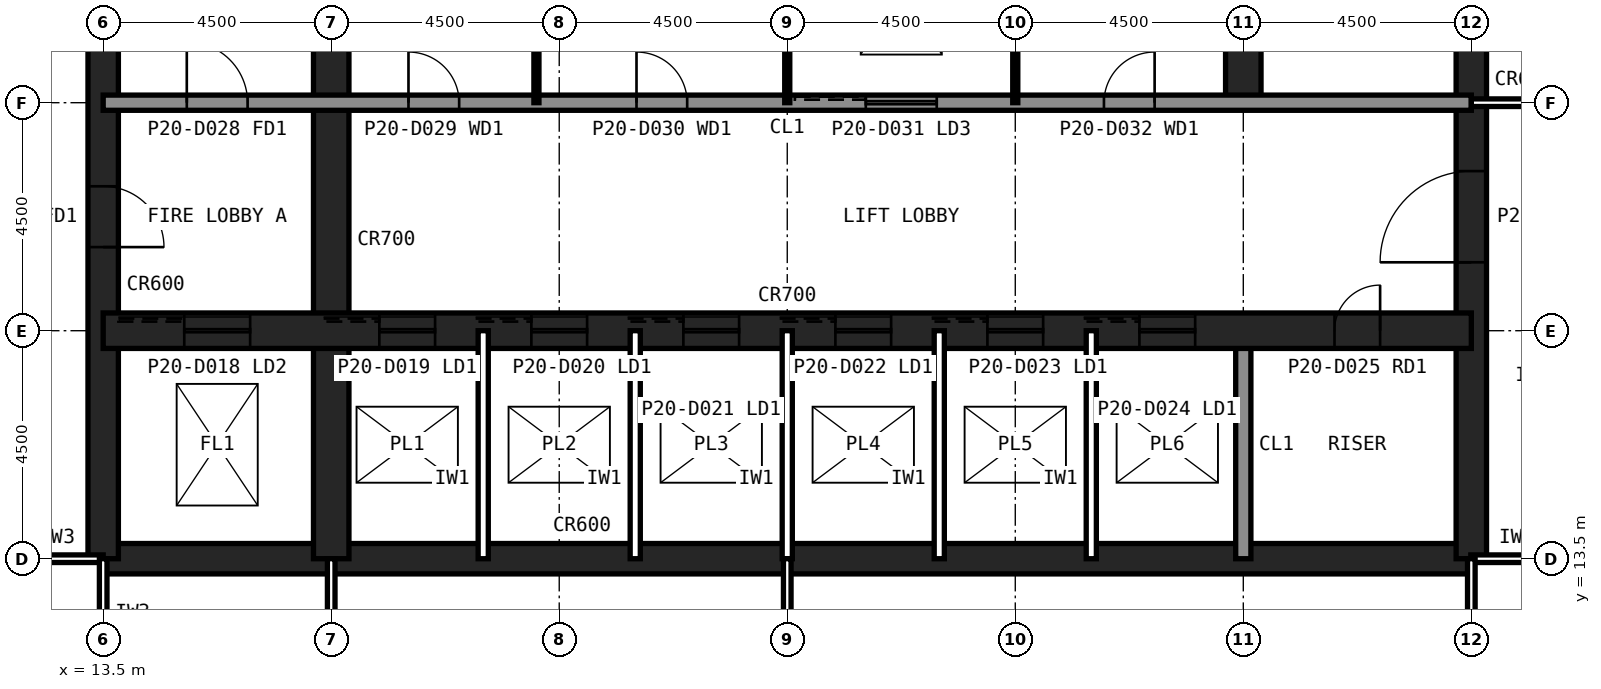
"""IFC4 building model, lengths in metres.
Left out: names, types, materials, properties, quantities, classifications, styles, units other than length and angle.
Written with IfcOpenShell. Run it as: python <this file> out.ifc"""

import sys

from ifc_helpers import new_model, si_unit, direction, frame, frame_2d, origin, place, context, subcontext, project, spatial, rectangle, extrude, element, fill, save


model = new_model("IFC4")
c1 = context("Model", 3, precision=1e-05, world=origin(), true_north=direction((0.0, 1.0)))
c2 = subcontext(c1, "Body", "Model", "MODEL_VIEW")
j1 = project(units=[si_unit("LENGTHUNIT", "METRE"), si_unit("PLANEANGLEUNIT", "RADIAN")], contexts=[c1])
p1 = place(None, origin())
s1 = spatial("IfcSite", under=j1, at=p1, CompositionType="ELEMENT")
p2 = place(p1, origin())
s2 = spatial("IfcBuilding", under=s1, at=p2, CompositionType="ELEMENT")
p3 = place(p2, frame((0.0, 0.0, 87.8)))
s3 = spatial("IfcBuildingStorey", under=s2, at=p3, CompositionType="ELEMENT", Elevation=87.8)
p4 = place(p3, frame((13.5, 13.5, 0.0), z_axis=(0.0, 0.0, 1.0), x_axis=(1.0, 0.0, 0.0)))
e1 = element("IfcWall", 1, at=p4, inside=s3, PredefinedType="SHEAR", context=c2, shape_type="SweptSolid", body=[
    extrude(rectangle(XDim=27.0, YDim=0.6, at=frame_2d((13.5, 0.0))), origin(), (0.0, 0.0, 1.0), 4.2),
])
p5 = place(p3, frame((40.5, 13.5, 0.0), z_axis=(0.0, 0.0, 1.0), x_axis=(0.0, 1.0, 0.0)))
e2 = element("IfcWall", 2, at=p5, inside=s3, PredefinedType="SHEAR", context=c2, shape_type="SweptSolid", body=[
    extrude(rectangle(XDim=27.0, YDim=0.6, at=frame_2d((13.5, 0.0))), origin(), (0.0, 0.0, 1.0), 4.2),
])
p6 = place(p5, frame((5.85, 0.0, 0.0)))
e3 = element("IfcOpeningElement", 3, at=p6, cuts=e2, PredefinedType="OPENING", context=c2, shape_type="SweptSolid", body=[
    extrude(rectangle(XDim=1.8, YDim=2.1, at=frame_2d((0.9, 1.05))), frame((0.0, 0.31, 0.0), z_axis=(0.0, -1.0, 0.0), x_axis=(1.0, 0.0, 0.0)), (0.0, 0.0, 1.0), 0.62),
])
p7 = place(p5, frame((19.65, 0.0, 0.0)))
e4 = element("IfcOpeningElement", 4, at=p7, cuts=e2, PredefinedType="OPENING", context=c2, shape_type="SweptSolid", body=[
    extrude(rectangle(XDim=1.2, YDim=2.1, at=frame_2d((0.6, 1.05))), frame((0.0, 0.31, 0.0), z_axis=(0.0, -1.0, 0.0), x_axis=(1.0, 0.0, 0.0)), (0.0, 0.0, 1.0), 0.62),
])
p8 = place(p3, frame((13.5, 40.5, 0.0), z_axis=(0.0, 0.0, 1.0), x_axis=(0.0, -1.0, 0.0)))
e5 = element("IfcWall", 5, at=p8, inside=s3, PredefinedType="SHEAR", context=c2, shape_type="SweptSolid", body=[
    extrude(rectangle(XDim=27.0, YDim=0.6, at=frame_2d((13.5, 0.0))), origin(), (0.0, 0.0, 1.0), 4.2),
])
p9 = place(p8, frame((19.65, 0.0, 0.0)))
e6 = element("IfcOpeningElement", 6, at=p9, cuts=e5, PredefinedType="OPENING", context=c2, shape_type="SweptSolid", body=[
    extrude(rectangle(XDim=1.2, YDim=2.1, at=frame_2d((0.6, 1.05))), frame((0.0, 0.31, 0.0), z_axis=(0.0, -1.0, 0.0), x_axis=(1.0, 0.0, 0.0)), (0.0, 0.0, 1.0), 0.62),
])
p10 = place(p8, frame((5.85, 0.0, 0.0)))
e7 = element("IfcOpeningElement", 7, at=p10, cuts=e5, PredefinedType="OPENING", context=c2, shape_type="SweptSolid", body=[
    extrude(rectangle(XDim=1.8, YDim=2.1, at=frame_2d((0.9, 1.05))), frame((0.0, 0.31, 0.0), z_axis=(0.0, -1.0, 0.0), x_axis=(1.0, 0.0, 0.0)), (0.0, 0.0, 1.0), 0.62),
])
p11 = place(p3, frame((18.0, 13.5, 0.0), z_axis=(0.0, 0.0, 1.0), x_axis=(0.0, 1.0, 0.0)))
e8 = element("IfcWall", 8, at=p11, inside=s3, PredefinedType="SHEAR", context=c2, shape_type="SweptSolid", body=[
    extrude(rectangle(XDim=18.0, YDim=0.7, at=frame_2d((9.0, 0.0))), origin(), (0.0, 0.0, 1.0), 4.2),
])
p12 = place(p3, frame((36.0, 13.5, 0.0), z_axis=(0.0, 0.0, 1.0), x_axis=(0.0, 1.0, 0.0)))
e9 = element("IfcWall", 9, at=p12, inside=s3, PredefinedType="SOLIDWALL", context=c2, shape_type="SweptSolid", body=[
    extrude(rectangle(XDim=4.5, YDim=0.3, at=frame_2d((2.25, 0.0))), origin(), (0.0, 0.0, 1.0), 4.04),
])
p13 = place(p3, frame((36.0, 22.5, 0.0), z_axis=(0.0, 0.0, 1.0), x_axis=(0.0, 1.0, 0.0)))
e10 = element("IfcWall", 10, at=p13, inside=s3, PredefinedType="SHEAR", context=c2, shape_type="SweptSolid", body=[
    extrude(rectangle(XDim=18.0, YDim=0.7, at=frame_2d((9.0, 0.0))), origin(), (0.0, 0.0, 1.0), 4.2),
])
p14 = place(p3, frame((13.5, 18.0, 0.0), z_axis=(0.0, 0.0, 1.0), x_axis=(1.0, 0.0, 0.0)))
e11 = element("IfcWall", 11, at=p14, inside=s3, PredefinedType="SHEAR", context=c2, shape_type="SweptSolid", body=[
    extrude(rectangle(XDim=27.0, YDim=0.7, at=frame_2d((13.5, 0.0))), origin(), (0.0, 0.0, 1.0), 4.2),
])
p15 = place(p14, frame((24.3, 0.0, 0.0)))
e12 = element("IfcOpeningElement", 12, at=p15, cuts=e11, PredefinedType="OPENING", context=c2, shape_type="SweptSolid", body=[
    extrude(rectangle(XDim=0.9, YDim=2.1, at=frame_2d((0.45, 1.05))), frame((0.0, 0.36, 0.0), z_axis=(0.0, -1.0, 0.0), x_axis=(1.0, 0.0, 0.0)), (0.0, 0.0, 1.0), 0.72),
])
p16 = place(p14, frame((5.45, 0.0, 0.0)))
e13 = element("IfcOpeningElement", 13, at=p16, cuts=e11, PredefinedType="OPENING", context=c2, shape_type="SweptSolid", body=[
    extrude(rectangle(XDim=1.1, YDim=2.1, at=frame_2d((0.55, 1.05))), frame((0.0, 0.36, 0.0), z_axis=(0.0, -1.0, 0.0), x_axis=(1.0, 0.0, 0.0)), (0.0, 0.0, 1.0), 0.72),
])
p17 = place(p14, frame((8.45, 0.0, 0.0)))
e14 = element("IfcOpeningElement", 14, at=p17, cuts=e11, PredefinedType="OPENING", context=c2, shape_type="SweptSolid", body=[
    extrude(rectangle(XDim=1.1, YDim=2.1, at=frame_2d((0.55, 1.05))), frame((0.0, 0.36, 0.0), z_axis=(0.0, -1.0, 0.0), x_axis=(1.0, 0.0, 0.0)), (0.0, 0.0, 1.0), 0.72),
])
p18 = place(p14, frame((11.45, 0.0, 0.0)))
e15 = element("IfcOpeningElement", 15, at=p18, cuts=e11, PredefinedType="OPENING", context=c2, shape_type="SweptSolid", body=[
    extrude(rectangle(XDim=1.1, YDim=2.1, at=frame_2d((0.55, 1.05))), frame((0.0, 0.36, 0.0), z_axis=(0.0, -1.0, 0.0), x_axis=(1.0, 0.0, 0.0)), (0.0, 0.0, 1.0), 0.72),
])
p19 = place(p14, frame((14.45, 0.0, 0.0)))
e16 = element("IfcOpeningElement", 16, at=p19, cuts=e11, PredefinedType="OPENING", context=c2, shape_type="SweptSolid", body=[
    extrude(rectangle(XDim=1.1, YDim=2.1, at=frame_2d((0.55, 1.05))), frame((0.0, 0.36, 0.0), z_axis=(0.0, -1.0, 0.0), x_axis=(1.0, 0.0, 0.0)), (0.0, 0.0, 1.0), 0.72),
])
p20 = place(p14, frame((17.45, 0.0, 0.0)))
e17 = element("IfcOpeningElement", 17, at=p20, cuts=e11, PredefinedType="OPENING", context=c2, shape_type="SweptSolid", body=[
    extrude(rectangle(XDim=1.1, YDim=2.1, at=frame_2d((0.55, 1.05))), frame((0.0, 0.36, 0.0), z_axis=(0.0, -1.0, 0.0), x_axis=(1.0, 0.0, 0.0)), (0.0, 0.0, 1.0), 0.72),
])
p21 = place(p14, frame((20.45, 0.0, 0.0)))
e18 = element("IfcOpeningElement", 18, at=p21, cuts=e11, PredefinedType="OPENING", context=c2, shape_type="SweptSolid", body=[
    extrude(rectangle(XDim=1.1, YDim=2.1, at=frame_2d((0.55, 1.05))), frame((0.0, 0.36, 0.0), z_axis=(0.0, -1.0, 0.0), x_axis=(1.0, 0.0, 0.0)), (0.0, 0.0, 1.0), 0.72),
])
p22 = place(p14, frame((1.6, 0.0, 0.0)))
e19 = element("IfcOpeningElement", 19, at=p22, cuts=e11, PredefinedType="OPENING", context=c2, shape_type="SweptSolid", body=[
    extrude(rectangle(XDim=1.3, YDim=2.2, at=frame_2d((0.65, 1.1))), frame((0.0, 0.36, 0.0), z_axis=(0.0, -1.0, 0.0), x_axis=(1.0, 0.0, 0.0)), (0.0, 0.0, 1.0), 0.72),
])
p23 = place(p3, frame((13.5, 22.5, 0.0), z_axis=(0.0, 0.0, 1.0), x_axis=(1.0, 0.0, 0.0)))
e20 = element("IfcWall", 20, at=p23, inside=s3, PredefinedType="SOLIDWALL", context=c2, shape_type="SweptSolid", body=[
    extrude(rectangle(XDim=27.0, YDim=0.3, at=frame_2d((13.5, 0.0))), origin(), (0.0, 0.0, 1.0), 4.04),
])
p24 = place(p23, frame((1.65, 0.0, 0.0)))
e21 = element("IfcOpeningElement", 21, at=p24, cuts=e20, PredefinedType="OPENING", context=c2, shape_type="SweptSolid", body=[
    extrude(rectangle(XDim=1.2, YDim=2.1, at=frame_2d((0.6, 1.05))), frame((0.0, 0.16, 0.0), z_axis=(0.0, -1.0, 0.0), x_axis=(1.0, 0.0, 0.0)), (0.0, 0.0, 1.0), 0.32),
])
p25 = place(p23, frame((6.025, 0.0, 0.0)))
e22 = element("IfcOpeningElement", 22, at=p25, cuts=e20, PredefinedType="OPENING", context=c2, shape_type="SweptSolid", body=[
    extrude(rectangle(XDim=1.0, YDim=2.1, at=frame_2d((0.5, 1.05))), frame((0.0, 0.16, 0.0), z_axis=(0.0, -1.0, 0.0), x_axis=(1.0, 0.0, 0.0)), (0.0, 0.0, 1.0), 0.32),
])
p26 = place(p23, frame((10.525, 0.0, 0.0)))
e23 = element("IfcOpeningElement", 23, at=p26, cuts=e20, PredefinedType="OPENING", context=c2, shape_type="SweptSolid", body=[
    extrude(rectangle(XDim=1.0, YDim=2.1, at=frame_2d((0.5, 1.05))), frame((0.0, 0.16, 0.0), z_axis=(0.0, -1.0, 0.0), x_axis=(1.0, 0.0, 0.0)), (0.0, 0.0, 1.0), 0.32),
])
p27 = place(p23, frame((19.75, 0.0, 0.0)))
e24 = element("IfcOpeningElement", 24, at=p27, cuts=e20, PredefinedType="OPENING", context=c2, shape_type="SweptSolid", body=[
    extrude(rectangle(XDim=1.0, YDim=2.1, at=frame_2d((0.5, 1.05))), frame((0.0, 0.16, 0.0), z_axis=(0.0, -1.0, 0.0), x_axis=(1.0, 0.0, 0.0)), (0.0, 0.0, 1.0), 0.32),
])
p28 = place(p23, frame((15.05, 0.0, 0.0)))
e25 = element("IfcOpeningElement", 25, at=p28, cuts=e20, PredefinedType="OPENING", context=c2, shape_type="SweptSolid", body=[
    extrude(rectangle(XDim=1.4, YDim=2.4, at=frame_2d((0.7, 1.2))), frame((0.0, 0.16, 0.0), z_axis=(0.0, -1.0, 0.0), x_axis=(1.0, 0.0, 0.0)), (0.0, 0.0, 1.0), 0.32),
])
for number, where, z_axis, x_axis in (
    (26, (21.0, 13.5, 0.0), (0.0, 0.0, 1.0), (0.0, 1.0, 0.0)),
    (27, (24.0, 13.5, 0.0), (0.0, 0.0, 1.0), (0.0, 1.0, 0.0)),
    (28, (27.0, 13.5, 0.0), (0.0, 0.0, 1.0), (0.0, 1.0, 0.0)),
    (29, (30.0, 13.5, 0.0), (0.0, 0.0, 1.0), (0.0, 1.0, 0.0)),
    (30, (33.0, 13.5, 0.0), (0.0, 0.0, 1.0), (0.0, 1.0, 0.0)),
):
    element("IfcWall", number, at=place(p3, frame(where, z_axis=z_axis, x_axis=x_axis)), inside=s3, PredefinedType="PARTITIONING", context=c2, shape_type="SweptSolid", body=[
        extrude(rectangle(XDim=4.5, YDim=0.2, at=frame_2d((2.25, 0.0))), origin(), (0.0, 0.0, 1.0), 4.04),
    ])
for number, where, z_axis, x_axis in (
    (31, (22.05, 22.5, 0.0), (0.0, 0.0, 1.0), (0.0, 1.0, 0.0)),
    (32, (27.0, 22.5, 0.0), (0.0, 0.0, 1.0), (0.0, 1.0, 0.0)),
    (33, (31.5, 22.5, 0.0), (0.0, 0.0, 1.0), (0.0, 1.0, 0.0)),
):
    element("IfcWall", number, at=place(p3, frame(where, z_axis=z_axis, x_axis=x_axis)), inside=s3, PredefinedType="PLUMBINGWALL", context=c2, shape_type="SweptSolid", body=[
        extrude(rectangle(XDim=9.0, YDim=0.1, at=frame_2d((4.5, 0.0))), origin(), (0.0, 0.0, 1.0), 4.04),
    ])
p29 = place(p3, frame((40.49, 13.5, 0.0), z_axis=(0.0, 0.0, 1.0), x_axis=(1.0, 0.0, 0.0)))
e34 = element("IfcWall", 34, at=p29, inside=s3, PredefinedType="PARTITIONING", context=c2, shape_type="SweptSolid", body=[
    extrude(rectangle(XDim=1.81, YDim=0.15, at=frame_2d((0.905, 0.0))), origin(), (0.0, 0.0, 1.0), 3.189),
])
p30 = place(p3, frame((11.7, 13.5, 0.0), z_axis=(0.0, 0.0, 1.0), x_axis=(1.0, 0.0, 0.0)))
e35 = element("IfcWall", 35, at=p30, inside=s3, PredefinedType="PARTITIONING", context=c2, shape_type="SweptSolid", body=[
    extrude(rectangle(XDim=1.8, YDim=0.15, at=frame_2d((0.9, 0.0))), origin(), (0.0, 0.0, 1.0), 3.189),
])
p31 = place(p3, frame((18.0, 8.1, 0.0), z_axis=(0.0, 0.0, 1.0), x_axis=(0.0, 1.0, 0.0)))
e36 = element("IfcWall", 36, at=p31, inside=s3, PredefinedType="PARTITIONING", context=c2, shape_type="SweptSolid", body=[
    extrude(rectangle(XDim=5.4, YDim=0.15, at=frame_2d((2.7, 0.0))), origin(), (0.0, 0.0, 1.0), 3.189),
])
p32 = place(p3, frame((13.5, 13.5, 0.0), z_axis=(0.0, 0.0, 1.0), x_axis=(0.0, -1.0, 0.0)))
e37 = element("IfcWall", 37, at=p32, inside=s3, PredefinedType="PARTITIONING", context=c2, shape_type="SweptSolid", body=[
    extrude(rectangle(XDim=5.4, YDim=0.15, at=frame_2d((2.7, 0.0))), origin(), (0.0, 0.0, 1.0), 3.189),
])
p33 = place(p32, frame((2.2, 0.0, 0.0)))
e38 = element("IfcOpeningElement", 38, at=p33, cuts=e37, PredefinedType="OPENING", context=c2, shape_type="SweptSolid", body=[
    extrude(rectangle(XDim=1.0, YDim=2.1, at=frame_2d((0.5, 1.05))), frame((0.0, 0.085, 0.0), z_axis=(0.0, -1.0, 0.0), x_axis=(1.0, 0.0, 0.0)), (0.0, 0.0, 1.0), 0.17),
])
p34 = place(p3, frame((27.0, 9.0, 0.0), z_axis=(0.0, 0.0, 1.0), x_axis=(0.0, 1.0, 0.0)))
e39 = element("IfcWall", 39, at=p34, inside=s3, PredefinedType="PARTITIONING", context=c2, shape_type="SweptSolid", body=[
    extrude(rectangle(XDim=4.5, YDim=0.15, at=frame_2d((2.25, 0.0))), origin(), (0.0, 0.0, 1.0), 3.189),
])
p35 = place(p34, frame((1.75, 0.0, 0.0)))
e40 = element("IfcOpeningElement", 40, at=p35, cuts=e39, PredefinedType="OPENING", context=c2, shape_type="SweptSolid", body=[
    extrude(rectangle(XDim=1.0, YDim=2.1, at=frame_2d((0.5, 1.05))), frame((0.0, 0.085, 0.0), z_axis=(0.0, -1.0, 0.0), x_axis=(1.0, 0.0, 0.0)), (0.0, 0.0, 1.0), 0.17),
])
p36 = place(p3, frame((40.5, 22.5, 0.0), z_axis=(0.0, 0.0, 1.0), x_axis=(1.0, 0.0, 0.0)))
e41 = element("IfcWall", 41, at=p36, inside=s3, PredefinedType="PARTITIONING", context=c2, shape_type="SweptSolid", body=[
    extrude(rectangle(XDim=3.6, YDim=0.15, at=frame_2d((1.8, 0.0))), origin(), (0.0, 0.0, 1.0), 3.189),
])
p37 = place(p3, frame((40.5, 0.445, 0.0), z_axis=(0.0, 0.0, 1.0), x_axis=(0.0, 1.0, 0.0)))
e42 = element("IfcWall", 42, at=p37, inside=s3, PredefinedType="PARTITIONING", context=c2, shape_type="SweptSolid", body=[
    extrude(rectangle(XDim=13.055, YDim=0.15, at=frame_2d((6.527, 0.0))), origin(), (0.0, 0.0, 1.0), 3.189),
])
p38 = place(p37, frame((6.028, 0.0, 0.0)))
e43 = element("IfcOpeningElement", 43, at=p38, cuts=e42, PredefinedType="OPENING", context=c2, shape_type="SweptSolid", body=[
    extrude(rectangle(XDim=1.0, YDim=2.1, at=frame_2d((0.5, 1.05))), frame((0.0, 0.085, 0.0), z_axis=(0.0, -1.0, 0.0), x_axis=(1.0, 0.0, 0.0)), (0.0, 0.0, 1.0), 0.17),
])
p39 = place(p9, origin())
e44 = element("IfcDoor", 44, at=p39, inside=s3, OperationType="SINGLE_SWING_RIGHT", PredefinedType="DOOR", context=c2, shape_type="SweptSolid", body=[
    extrude(rectangle(XDim=1.2, YDim=2.1, at=frame_2d((0.6, 1.05))), frame((0.0, 0.025, 0.0), z_axis=(0.0, -1.0, 0.0), x_axis=(1.0, 0.0, 0.0)), (0.0, 0.0, 1.0), 0.05),
])
fill(e6, e44)
p40 = place(p6, origin())
e45 = element("IfcDoor", 45, at=p40, inside=s3, OperationType="SINGLE_SWING_LEFT", PredefinedType="DOOR", context=c2, shape_type="SweptSolid", body=[
    extrude(rectangle(XDim=1.8, YDim=2.1, at=frame_2d((0.9, 1.05))), frame((0.0, 0.025, 0.0), z_axis=(0.0, -1.0, 0.0), x_axis=(1.0, 0.0, 0.0)), (0.0, 0.0, 1.0), 0.05),
])
fill(e3, e45)
p41 = place(p24, origin())
e46 = element("IfcDoor", 46, at=p41, inside=s3, OperationType="SINGLE_SWING_LEFT", PredefinedType="DOOR", context=c2, shape_type="SweptSolid", body=[
    extrude(rectangle(XDim=1.2, YDim=2.1, at=frame_2d((0.6, 1.05))), frame((0.0, 0.025, 0.0), z_axis=(0.0, -1.0, 0.0), x_axis=(1.0, 0.0, 0.0)), (0.0, 0.0, 1.0), 0.05),
])
fill(e21, e46)
p42 = place(p25, origin())
e47 = element("IfcDoor", 47, at=p42, inside=s3, OperationType="SINGLE_SWING_LEFT", PredefinedType="DOOR", context=c2, shape_type="SweptSolid", body=[
    extrude(rectangle(XDim=1.0, YDim=2.1, at=frame_2d((0.5, 1.05))), frame((0.0, 0.025, 0.0), z_axis=(0.0, -1.0, 0.0), x_axis=(1.0, 0.0, 0.0)), (0.0, 0.0, 1.0), 0.05),
])
fill(e22, e47)
p43 = place(p26, origin())
e48 = element("IfcDoor", 48, at=p43, inside=s3, OperationType="SINGLE_SWING_LEFT", PredefinedType="DOOR", context=c2, shape_type="SweptSolid", body=[
    extrude(rectangle(XDim=1.0, YDim=2.1, at=frame_2d((0.5, 1.05))), frame((0.0, 0.025, 0.0), z_axis=(0.0, -1.0, 0.0), x_axis=(1.0, 0.0, 0.0)), (0.0, 0.0, 1.0), 0.05),
])
fill(e23, e48)
p44 = place(p27, origin())
e49 = element("IfcDoor", 49, at=p44, inside=s3, OperationType="SINGLE_SWING_RIGHT", PredefinedType="DOOR", context=c2, shape_type="SweptSolid", body=[
    extrude(rectangle(XDim=1.0, YDim=2.1, at=frame_2d((0.5, 1.05))), frame((0.0, 0.025, 0.0), z_axis=(0.0, -1.0, 0.0), x_axis=(1.0, 0.0, 0.0)), (0.0, 0.0, 1.0), 0.05),
])
fill(e24, e49)
p45 = place(p15, origin())
e50 = element("IfcDoor", 50, at=p45, inside=s3, OperationType="SINGLE_SWING_RIGHT", PredefinedType="DOOR", context=c2, shape_type="SweptSolid", body=[
    extrude(rectangle(XDim=0.9, YDim=2.1, at=frame_2d((0.45, 1.05))), frame((0.0, 0.025, 0.0), z_axis=(0.0, -1.0, 0.0), x_axis=(1.0, 0.0, 0.0)), (0.0, 0.0, 1.0), 0.05),
])
fill(e12, e50)
p46 = place(p16, origin())
e51 = element("IfcDoor", 51, at=p46, inside=s3, OperationType="SLIDING_TO_LEFT", PredefinedType="DOOR", context=c2, shape_type="SweptSolid", body=[
    extrude(rectangle(XDim=1.1, YDim=2.1, at=frame_2d((0.55, 1.05))), frame((0.0, 0.025, 0.0), z_axis=(0.0, -1.0, 0.0), x_axis=(1.0, 0.0, 0.0)), (0.0, 0.0, 1.0), 0.05),
])
fill(e13, e51)
p47 = place(p17, origin())
e52 = element("IfcDoor", 52, at=p47, inside=s3, OperationType="SLIDING_TO_LEFT", PredefinedType="DOOR", context=c2, shape_type="SweptSolid", body=[
    extrude(rectangle(XDim=1.1, YDim=2.1, at=frame_2d((0.55, 1.05))), frame((0.0, 0.025, 0.0), z_axis=(0.0, -1.0, 0.0), x_axis=(1.0, 0.0, 0.0)), (0.0, 0.0, 1.0), 0.05),
])
fill(e14, e52)
p48 = place(p18, origin())
e53 = element("IfcDoor", 53, at=p48, inside=s3, OperationType="SLIDING_TO_LEFT", PredefinedType="DOOR", context=c2, shape_type="SweptSolid", body=[
    extrude(rectangle(XDim=1.1, YDim=2.1, at=frame_2d((0.55, 1.05))), frame((0.0, 0.025, 0.0), z_axis=(0.0, -1.0, 0.0), x_axis=(1.0, 0.0, 0.0)), (0.0, 0.0, 1.0), 0.05),
])
fill(e15, e53)
p49 = place(p19, origin())
e54 = element("IfcDoor", 54, at=p49, inside=s3, OperationType="SLIDING_TO_LEFT", PredefinedType="DOOR", context=c2, shape_type="SweptSolid", body=[
    extrude(rectangle(XDim=1.1, YDim=2.1, at=frame_2d((0.55, 1.05))), frame((0.0, 0.025, 0.0), z_axis=(0.0, -1.0, 0.0), x_axis=(1.0, 0.0, 0.0)), (0.0, 0.0, 1.0), 0.05),
])
fill(e16, e54)
p50 = place(p20, origin())
e55 = element("IfcDoor", 55, at=p50, inside=s3, OperationType="SLIDING_TO_LEFT", PredefinedType="DOOR", context=c2, shape_type="SweptSolid", body=[
    extrude(rectangle(XDim=1.1, YDim=2.1, at=frame_2d((0.55, 1.05))), frame((0.0, 0.025, 0.0), z_axis=(0.0, -1.0, 0.0), x_axis=(1.0, 0.0, 0.0)), (0.0, 0.0, 1.0), 0.05),
])
fill(e17, e55)
p51 = place(p21, origin())
e56 = element("IfcDoor", 56, at=p51, inside=s3, OperationType="SLIDING_TO_LEFT", PredefinedType="DOOR", context=c2, shape_type="SweptSolid", body=[
    extrude(rectangle(XDim=1.1, YDim=2.1, at=frame_2d((0.55, 1.05))), frame((0.0, 0.025, 0.0), z_axis=(0.0, -1.0, 0.0), x_axis=(1.0, 0.0, 0.0)), (0.0, 0.0, 1.0), 0.05),
])
fill(e18, e56)
p52 = place(p22, origin())
e57 = element("IfcDoor", 57, at=p52, inside=s3, OperationType="SLIDING_TO_LEFT", PredefinedType="DOOR", context=c2, shape_type="SweptSolid", body=[
    extrude(rectangle(XDim=1.3, YDim=2.2, at=frame_2d((0.65, 1.1))), frame((0.0, 0.025, 0.0), z_axis=(0.0, -1.0, 0.0), x_axis=(1.0, 0.0, 0.0)), (0.0, 0.0, 1.0), 0.05),
])
fill(e19, e57)
p53 = place(p28, origin())
e58 = element("IfcDoor", 58, at=p53, inside=s3, OperationType="SLIDING_TO_LEFT", PredefinedType="DOOR", context=c2, shape_type="SweptSolid", body=[
    extrude(rectangle(XDim=1.4, YDim=2.4, at=frame_2d((0.7, 1.2))), frame((0.0, 0.025, 0.0), z_axis=(0.0, -1.0, 0.0), x_axis=(1.0, 0.0, 0.0)), (0.0, 0.0, 1.0), 0.05),
])
fill(e25, e58)
save(model, sys.argv[1])
